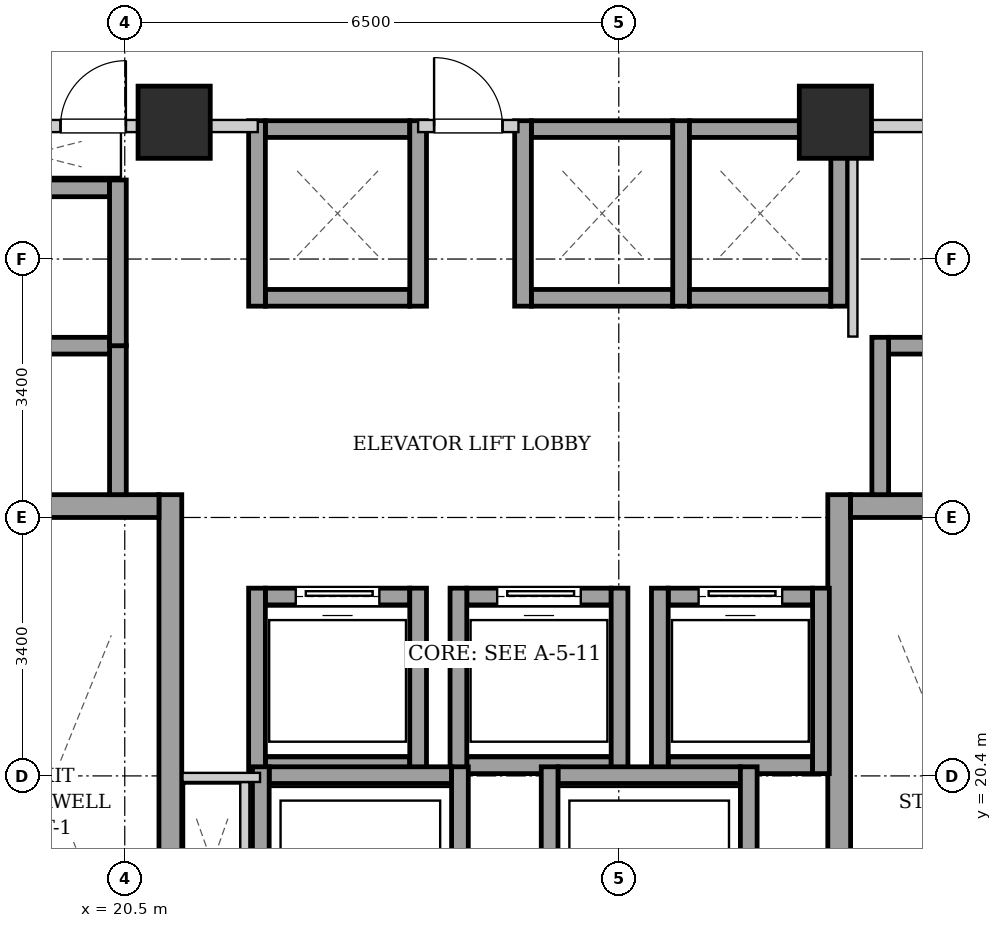
"""IFC4 building model, lengths in metres.
Left out: names, types, materials, properties, quantities, classifications, styles, units other than length and angle.
Written with IfcOpenShell. Run it as: python <this file> out.ifc"""

import sys

from ifc_helpers import new_model, si_unit, direction, frame, frame_2d, origin, origin_2d, place, context, subcontext, project, spatial, rectangle, extrude, element, fill, save


model = new_model("IFC4")
c1 = context("Model", 3, precision=1e-05, world=origin(), true_north=direction((0.0, 1.0)))
c2 = subcontext(c1, "Body", "Model", "MODEL_VIEW")
j1 = project(units=[si_unit("LENGTHUNIT", "METRE"), si_unit("PLANEANGLEUNIT", "RADIAN")], contexts=[c1])
p1 = place(None, origin())
s1 = spatial("IfcSite", under=j1, at=p1, CompositionType="ELEMENT")
p2 = place(p1, origin())
s2 = spatial("IfcBuilding", under=s1, at=p2, CompositionType="ELEMENT")
p3 = place(p2, frame((0.0, 0.0, 127.65)))
s3 = spatial("IfcBuildingStorey", under=s2, at=p3, CompositionType="ELEMENT", Elevation=127.65)
for number, where, z_axis, x_axis in (
    (1, (21.15, 29.0, 0.0), (0.0, 0.0, 1.0), (1.0, 0.0, 0.0)),
    (2, (29.85, 29.0, 0.0), (0.0, 0.0, 1.0), (1.0, 0.0, 0.0)),
):
    element("IfcColumn", number, at=place(p3, frame(where, z_axis=z_axis, x_axis=x_axis)), inside=s3, PredefinedType="COLUMN", context=c2, shape_type="SweptSolid", body=[
        extrude(rectangle(XDim=0.95, YDim=0.95, at=origin_2d()), origin(), (0.0, 0.0, 1.0), 3.25),
    ])
p4 = place(p3, frame((21.1, 15.1, 0.0), z_axis=(0.0, 0.0, 1.0), x_axis=(0.0, 1.0, 0.0)))
e3 = element("IfcWall", 3, at=p4, inside=s3, PredefinedType="SHEAR", context=c2, shape_type="SweptSolid", body=[
    extrude(rectangle(XDim=9.0, YDim=0.3, at=frame_2d((4.5, 0.0))), origin(), (0.0, 0.0, 1.0), 2.99),
])
p5 = place(p3, frame((18.1, 23.95, 0.0), z_axis=(0.0, 0.0, 1.0), x_axis=(1.0, 0.0, 0.0)))
e4 = element("IfcWall", 4, at=p5, inside=s3, PredefinedType="SHEAR", context=c2, shape_type="SweptSolid", body=[
    extrude(rectangle(XDim=2.85, YDim=0.3, at=frame_2d((1.425, 0.0))), origin(), (0.0, 0.0, 1.0), 2.99),
])
p6 = place(p3, frame((29.9, 15.1, 0.0), z_axis=(0.0, 0.0, 1.0), x_axis=(0.0, 1.0, 0.0)))
e5 = element("IfcWall", 5, at=p6, inside=s3, PredefinedType="SHEAR", context=c2, shape_type="SweptSolid", body=[
    extrude(rectangle(XDim=9.0, YDim=0.3, at=frame_2d((4.5, 0.0))), origin(), (0.0, 0.0, 1.0), 2.99),
])
p7 = place(p3, frame((30.05, 23.95, 0.0), z_axis=(0.0, 0.0, 1.0), x_axis=(1.0, 0.0, 0.0)))
e6 = element("IfcWall", 6, at=p7, inside=s3, PredefinedType="SHEAR", context=c2, shape_type="SweptSolid", body=[
    extrude(rectangle(XDim=2.85, YDim=0.3, at=frame_2d((1.425, 0.0))), origin(), (0.0, 0.0, 1.0), 2.99),
])
for number, where, z_axis, x_axis in (
    (7, (22.35, 26.69, 0.0), (0.0, 0.0, 1.0), (1.0, 0.0, 0.0)),
    (8, (22.35, 28.91, 0.0), (0.0, 0.0, 1.0), (1.0, 0.0, 0.0)),
):
    element("IfcWall", number, at=place(p3, frame(where, z_axis=z_axis, x_axis=x_axis)), inside=s3, PredefinedType="SHEAR", context=c2, shape_type="SweptSolid", body=[
        extrude(rectangle(XDim=1.9, YDim=0.22, at=frame_2d((0.95, 0.0))), origin(), (0.0, 0.0, 1.0), 2.99),
    ])
for number, where, z_axis, x_axis in (
    (9, (22.24, 26.58, 0.0), (0.0, 0.0, 1.0), (0.0, 1.0, 0.0)),
    (10, (24.36, 26.58, 0.0), (0.0, 0.0, 1.0), (0.0, 1.0, 0.0)),
):
    element("IfcWall", number, at=place(p3, frame(where, z_axis=z_axis, x_axis=x_axis)), inside=s3, PredefinedType="SHEAR", context=c2, shape_type="SweptSolid", body=[
        extrude(rectangle(XDim=2.44, YDim=0.22, at=frame_2d((1.22, 0.0))), origin(), (0.0, 0.0, 1.0), 2.99),
    ])
for number, where, z_axis, x_axis in (
    (11, (25.85, 26.69, 0.0), (0.0, 0.0, 1.0), (1.0, 0.0, 0.0)),
    (12, (25.85, 28.91, 0.0), (0.0, 0.0, 1.0), (1.0, 0.0, 0.0)),
):
    element("IfcWall", number, at=place(p3, frame(where, z_axis=z_axis, x_axis=x_axis)), inside=s3, PredefinedType="SHEAR", context=c2, shape_type="SweptSolid", body=[
        extrude(rectangle(XDim=1.86, YDim=0.22, at=frame_2d((0.93, 0.0))), origin(), (0.0, 0.0, 1.0), 2.99),
    ])
for number, where, z_axis, x_axis in (
    (13, (25.74, 26.58, 0.0), (0.0, 0.0, 1.0), (0.0, 1.0, 0.0)),
    (14, (27.82, 26.58, 0.0), (0.0, 0.0, 1.0), (0.0, 1.0, 0.0)),
):
    element("IfcWall", number, at=place(p3, frame(where, z_axis=z_axis, x_axis=x_axis)), inside=s3, PredefinedType="SHEAR", context=c2, shape_type="SweptSolid", body=[
        extrude(rectangle(XDim=2.44, YDim=0.22, at=frame_2d((1.22, 0.0))), origin(), (0.0, 0.0, 1.0), 2.99),
    ])
for number, where, z_axis, x_axis in (
    (15, (27.93, 26.69, 0.0), (0.0, 0.0, 1.0), (1.0, 0.0, 0.0)),
    (16, (27.93, 28.91, 0.0), (0.0, 0.0, 1.0), (1.0, 0.0, 0.0)),
):
    element("IfcWall", number, at=place(p3, frame(where, z_axis=z_axis, x_axis=x_axis)), inside=s3, PredefinedType="SHEAR", context=c2, shape_type="SweptSolid", body=[
        extrude(rectangle(XDim=1.86, YDim=0.22, at=frame_2d((0.93, 0.0))), origin(), (0.0, 0.0, 1.0), 2.99),
    ])
p8 = place(p3, frame((29.9, 26.58, 0.0), z_axis=(0.0, 0.0, 1.0), x_axis=(0.0, 1.0, 0.0)))
e17 = element("IfcWall", 17, at=p8, inside=s3, PredefinedType="SHEAR", context=c2, shape_type="SweptSolid", body=[
    extrude(rectangle(XDim=2.44, YDim=0.22, at=frame_2d((1.22, 0.0))), origin(), (0.0, 0.0, 1.0), 2.99),
])
p9 = place(p3, frame((22.35, 20.54, 0.0), z_axis=(0.0, 0.0, 1.0), x_axis=(1.0, 0.0, 0.0)))
e18 = element("IfcWall", 18, at=p9, inside=s3, PredefinedType="SHEAR", context=c2, shape_type="SweptSolid", body=[
    extrude(rectangle(XDim=1.9, YDim=0.22, at=frame_2d((0.95, 0.0))), origin(), (0.0, 0.0, 1.0), 2.99),
])
p10 = place(p3, frame((22.35, 22.76, 0.0), z_axis=(0.0, 0.0, 1.0), x_axis=(1.0, 0.0, 0.0)))
e19 = element("IfcWall", 19, at=p10, inside=s3, PredefinedType="SHEAR", context=c2, shape_type="SweptSolid", body=[
    extrude(rectangle(XDim=1.9, YDim=0.22, at=frame_2d((0.95, 0.0))), origin(), (0.0, 0.0, 1.0), 2.99),
])
p11 = place(p10, frame((0.4, 0.0, 0.0)))
e20 = element("IfcOpeningElement", 20, at=p11, cuts=e19, PredefinedType="OPENING", context=c2, shape_type="SweptSolid", body=[
    extrude(rectangle(XDim=1.1, YDim=2.15, at=frame_2d((0.55, 1.075))), frame((0.0, 0.12, 0.0), z_axis=(0.0, -1.0, 0.0), x_axis=(1.0, 0.0, 0.0)), (0.0, 0.0, 1.0), 0.24),
])
for number, where, z_axis, x_axis in (
    (21, (22.24, 20.43, 0.0), (0.0, 0.0, 1.0), (0.0, 1.0, 0.0)),
    (22, (24.36, 20.43, 0.0), (0.0, 0.0, 1.0), (0.0, 1.0, 0.0)),
):
    element("IfcWall", number, at=place(p3, frame(where, z_axis=z_axis, x_axis=x_axis)), inside=s3, PredefinedType="SHEAR", context=c2, shape_type="SweptSolid", body=[
        extrude(rectangle(XDim=2.44, YDim=0.22, at=frame_2d((1.22, 0.0))), origin(), (0.0, 0.0, 1.0), 2.99),
    ])
p12 = place(p3, frame((25.0, 20.54, 0.0), z_axis=(0.0, 0.0, 1.0), x_axis=(1.0, 0.0, 0.0)))
e23 = element("IfcWall", 23, at=p12, inside=s3, PredefinedType="SHEAR", context=c2, shape_type="SweptSolid", body=[
    extrude(rectangle(XDim=1.9, YDim=0.22, at=frame_2d((0.95, 0.0))), origin(), (0.0, 0.0, 1.0), 2.99),
])
p13 = place(p3, frame((25.0, 22.76, 0.0), z_axis=(0.0, 0.0, 1.0), x_axis=(1.0, 0.0, 0.0)))
e24 = element("IfcWall", 24, at=p13, inside=s3, PredefinedType="SHEAR", context=c2, shape_type="SweptSolid", body=[
    extrude(rectangle(XDim=1.9, YDim=0.22, at=frame_2d((0.95, 0.0))), origin(), (0.0, 0.0, 1.0), 2.99),
])
p14 = place(p13, frame((0.4, 0.0, 0.0)))
e25 = element("IfcOpeningElement", 25, at=p14, cuts=e24, PredefinedType="OPENING", context=c2, shape_type="SweptSolid", body=[
    extrude(rectangle(XDim=1.1, YDim=2.15, at=frame_2d((0.55, 1.075))), frame((0.0, 0.12, 0.0), z_axis=(0.0, -1.0, 0.0), x_axis=(1.0, 0.0, 0.0)), (0.0, 0.0, 1.0), 0.24),
])
for number, where, z_axis, x_axis in (
    (26, (24.89, 20.43, 0.0), (0.0, 0.0, 1.0), (0.0, 1.0, 0.0)),
    (27, (27.01, 20.43, 0.0), (0.0, 0.0, 1.0), (0.0, 1.0, 0.0)),
):
    element("IfcWall", number, at=place(p3, frame(where, z_axis=z_axis, x_axis=x_axis)), inside=s3, PredefinedType="SHEAR", context=c2, shape_type="SweptSolid", body=[
        extrude(rectangle(XDim=2.44, YDim=0.22, at=frame_2d((1.22, 0.0))), origin(), (0.0, 0.0, 1.0), 2.99),
    ])
p15 = place(p3, frame((27.65, 20.54, 0.0), z_axis=(0.0, 0.0, 1.0), x_axis=(1.0, 0.0, 0.0)))
e28 = element("IfcWall", 28, at=p15, inside=s3, PredefinedType="SHEAR", context=c2, shape_type="SweptSolid", body=[
    extrude(rectangle(XDim=1.9, YDim=0.22, at=frame_2d((0.95, 0.0))), origin(), (0.0, 0.0, 1.0), 2.99),
])
p16 = place(p3, frame((27.65, 22.76, 0.0), z_axis=(0.0, 0.0, 1.0), x_axis=(1.0, 0.0, 0.0)))
e29 = element("IfcWall", 29, at=p16, inside=s3, PredefinedType="SHEAR", context=c2, shape_type="SweptSolid", body=[
    extrude(rectangle(XDim=1.9, YDim=0.22, at=frame_2d((0.95, 0.0))), origin(), (0.0, 0.0, 1.0), 2.99),
])
p17 = place(p16, frame((0.4, 0.0, 0.0)))
e30 = element("IfcOpeningElement", 30, at=p17, cuts=e29, PredefinedType="OPENING", context=c2, shape_type="SweptSolid", body=[
    extrude(rectangle(XDim=1.1, YDim=2.15, at=frame_2d((0.55, 1.075))), frame((0.0, 0.12, 0.0), z_axis=(0.0, -1.0, 0.0), x_axis=(1.0, 0.0, 0.0)), (0.0, 0.0, 1.0), 0.24),
])
for number, where, z_axis, x_axis in (
    (31, (27.54, 20.43, 0.0), (0.0, 0.0, 1.0), (0.0, 1.0, 0.0)),
    (32, (29.66, 20.43, 0.0), (0.0, 0.0, 1.0), (0.0, 1.0, 0.0)),
):
    element("IfcWall", number, at=place(p3, frame(where, z_axis=z_axis, x_axis=x_axis)), inside=s3, PredefinedType="SHEAR", context=c2, shape_type="SweptSolid", body=[
        extrude(rectangle(XDim=2.44, YDim=0.22, at=frame_2d((1.22, 0.0))), origin(), (0.0, 0.0, 1.0), 2.99),
    ])
p18 = place(p3, frame((20.41, 24.1, 0.0), z_axis=(0.0, 0.0, 1.0), x_axis=(0.0, 1.0, 0.0)))
e33 = element("IfcWall", 33, at=p18, inside=s3, PredefinedType="SHEAR", context=c2, shape_type="SweptSolid", body=[
    extrude(rectangle(XDim=1.96, YDim=0.22, at=frame_2d((0.98, 0.0))), origin(), (0.0, 0.0, 1.0), 2.99),
])
for number, where, z_axis, x_axis in (
    (34, (18.4, 26.06, 0.0), (0.0, 0.0, 1.0), (1.0, 0.0, 0.0)),
    (35, (18.4, 28.13, 0.0), (0.0, 0.0, 1.0), (1.0, 0.0, 0.0)),
):
    element("IfcWall", number, at=place(p3, frame(where, z_axis=z_axis, x_axis=x_axis)), inside=s3, PredefinedType="SHEAR", context=c2, shape_type="SweptSolid", body=[
        extrude(rectangle(XDim=1.9, YDim=0.22, at=frame_2d((0.95, 0.0))), origin(), (0.0, 0.0, 1.0), 2.99),
    ])
p19 = place(p3, frame((20.41, 26.06, 0.0), z_axis=(0.0, 0.0, 1.0), x_axis=(0.0, 1.0, 0.0)))
e36 = element("IfcWall", 36, at=p19, inside=s3, PredefinedType="SHEAR", context=c2, shape_type="SweptSolid", body=[
    extrude(rectangle(XDim=2.18, YDim=0.22, at=frame_2d((1.09, 0.0))), origin(), (0.0, 0.0, 1.0), 2.99),
])
p20 = place(p3, frame((30.55, 26.06, 0.0), z_axis=(0.0, 0.0, 1.0), x_axis=(1.0, 0.0, 0.0)))
e37 = element("IfcWall", 37, at=p20, inside=s3, PredefinedType="SHEAR", context=c2, shape_type="SweptSolid", body=[
    extrude(rectangle(XDim=1.9, YDim=0.22, at=frame_2d((0.95, 0.0))), origin(), (0.0, 0.0, 1.0), 2.99),
])
p21 = place(p3, frame((30.44, 24.1, 0.0), z_axis=(0.0, 0.0, 1.0), x_axis=(0.0, 1.0, 0.0)))
e38 = element("IfcWall", 38, at=p21, inside=s3, PredefinedType="SHEAR", context=c2, shape_type="SweptSolid", body=[
    extrude(rectangle(XDim=2.07, YDim=0.22, at=frame_2d((1.035, 0.0))), origin(), (0.0, 0.0, 1.0), 2.99),
])
p22 = place(p3, frame((22.4, 20.41, 0.0), z_axis=(0.0, 0.0, 1.0), x_axis=(1.0, 0.0, 0.0)))
e39 = element("IfcWall", 39, at=p22, inside=s3, PredefinedType="SHEAR", context=c2, shape_type="SweptSolid", body=[
    extrude(rectangle(XDim=2.4, YDim=0.22, at=frame_2d((1.2, 0.0))), origin(), (0.0, 0.0, 1.0), 2.99),
])
for number, where, z_axis, x_axis in (
    (40, (22.29, 17.98, 0.0), (0.0, 0.0, 1.0), (0.0, 1.0, 0.0)),
    (41, (24.91, 17.98, 0.0), (0.0, 0.0, 1.0), (0.0, 1.0, 0.0)),
):
    element("IfcWall", number, at=place(p3, frame(where, z_axis=z_axis, x_axis=x_axis)), inside=s3, PredefinedType="SHEAR", context=c2, shape_type="SweptSolid", body=[
        extrude(rectangle(XDim=2.54, YDim=0.22, at=frame_2d((1.27, 0.0))), origin(), (0.0, 0.0, 1.0), 2.99),
    ])
p23 = place(p3, frame((26.2, 20.41, 0.0), z_axis=(0.0, 0.0, 1.0), x_axis=(1.0, 0.0, 0.0)))
e42 = element("IfcWall", 42, at=p23, inside=s3, PredefinedType="SHEAR", context=c2, shape_type="SweptSolid", body=[
    extrude(rectangle(XDim=2.4, YDim=0.22, at=frame_2d((1.2, 0.0))), origin(), (0.0, 0.0, 1.0), 2.99),
])
for number, where, z_axis, x_axis in (
    (43, (26.09, 17.98, 0.0), (0.0, 0.0, 1.0), (0.0, 1.0, 0.0)),
    (44, (28.71, 17.98, 0.0), (0.0, 0.0, 1.0), (0.0, 1.0, 0.0)),
):
    element("IfcWall", number, at=place(p3, frame(where, z_axis=z_axis, x_axis=x_axis)), inside=s3, PredefinedType="SHEAR", context=c2, shape_type="SweptSolid", body=[
        extrude(rectangle(XDim=2.54, YDim=0.22, at=frame_2d((1.27, 0.0))), origin(), (0.0, 0.0, 1.0), 2.99),
    ])
p24 = place(p3, frame((24.36, 28.95, 0.0), z_axis=(0.0, 0.0, 1.0), x_axis=(1.0, 0.0, 0.0)))
e45 = element("IfcWall", 45, at=p24, inside=s3, PredefinedType="PARTITIONING", context=c2, shape_type="SweptSolid", body=[
    extrude(rectangle(XDim=1.32, YDim=0.16, at=frame_2d((0.66, 0.0))), origin(), (0.0, 0.0, 1.0), 2.426),
])
p25 = place(p24, frame((0.21, 0.0, 0.0)))
e46 = element("IfcOpeningElement", 46, at=p25, cuts=e45, PredefinedType="OPENING", context=c2, shape_type="SweptSolid", body=[
    extrude(rectangle(XDim=0.9, YDim=2.05, at=frame_2d((0.45, 1.025))), frame((0.0, 0.09, 0.0), z_axis=(0.0, -1.0, 0.0), x_axis=(1.0, 0.0, 0.0)), (0.0, 0.0, 1.0), 0.18),
])
p26 = place(p3, frame((17.96, 28.95, 0.0), z_axis=(0.0, 0.0, 1.0), x_axis=(1.0, 0.0, 0.0)))
e47 = element("IfcWall", 47, at=p26, inside=s3, PredefinedType="PARTITIONING", context=c2, shape_type="SweptSolid", body=[
    extrude(rectangle(XDim=4.29, YDim=0.16, at=frame_2d((2.145, 0.0))), origin(), (0.0, 0.0, 1.0), 2.426),
])
p27 = place(p26, frame((1.695, 0.0, 0.0)))
e48 = element("IfcOpeningElement", 48, at=p27, cuts=e47, PredefinedType="OPENING", context=c2, shape_type="SweptSolid", body=[
    extrude(rectangle(XDim=0.86, YDim=2.05, at=frame_2d((0.43, 1.025))), frame((0.0, 0.09, 0.0), z_axis=(0.0, -1.0, 0.0), x_axis=(1.0, 0.0, 0.0)), (0.0, 0.0, 1.0), 0.18),
])
p28 = place(p3, frame((22.08, 18.2, 0.0), z_axis=(0.0, 0.0, 1.0), x_axis=(0.0, 1.0, 0.0)))
e49 = element("IfcWall", 49, at=p28, inside=s3, PredefinedType="PARTITIONING", context=c2, shape_type="SweptSolid", body=[
    extrude(rectangle(XDim=2.12, YDim=0.12, at=frame_2d((1.06, 0.0))), origin(), (0.0, 0.0, 1.0), 2.99),
])
p29 = place(p3, frame((22.28, 20.38, 0.0), z_axis=(0.0, 0.0, 1.0), x_axis=(-1.0, 0.0, 0.0)))
e50 = element("IfcWall", 50, at=p29, inside=s3, PredefinedType="PARTITIONING", context=c2, shape_type="SweptSolid", body=[
    extrude(rectangle(XDim=1.02, YDim=0.12, at=frame_2d((0.51, 0.0))), origin(), (0.0, 0.0, 1.0), 2.99),
])
p30 = place(p3, frame((30.08, 26.18, 0.0), z_axis=(0.0, 0.0, 1.0), x_axis=(0.0, 1.0, 0.0)))
e51 = element("IfcWall", 51, at=p30, inside=s3, PredefinedType="PARTITIONING", context=c2, shape_type="SweptSolid", body=[
    extrude(rectangle(XDim=2.68, YDim=0.12, at=frame_2d((1.34, 0.0))), origin(), (0.0, 0.0, 1.0), 2.99),
])
p31 = place(p3, frame((30.08, 28.95, 0.0), z_axis=(0.0, 0.0, 1.0), x_axis=(1.0, 0.0, 0.0)))
e52 = element("IfcWall", 52, at=p31, inside=s3, PredefinedType="PARTITIONING", context=c2, shape_type="SweptSolid", body=[
    extrude(rectangle(XDim=2.96, YDim=0.16, at=frame_2d((1.48, 0.0))), origin(), (0.0, 0.0, 1.0), 2.99),
])
p32 = place(p31, frame((1.045, 0.0, 0.0)))
e53 = element("IfcOpeningElement", 53, at=p32, cuts=e52, PredefinedType="OPENING", context=c2, shape_type="SweptSolid", body=[
    extrude(rectangle(XDim=0.86, YDim=2.05, at=frame_2d((0.43, 1.025))), frame((0.0, 0.09, 0.0), z_axis=(0.0, -1.0, 0.0), x_axis=(1.0, 0.0, 0.0)), (0.0, 0.0, 1.0), 0.18),
])
p33 = place(p11, origin())
e54 = element("IfcDoor", 54, at=p33, inside=s3, OperationType="SLIDING_TO_LEFT", PredefinedType="DOOR", context=c2, shape_type="SweptSolid", body=[
    extrude(rectangle(XDim=1.1, YDim=2.15, at=frame_2d((0.55, 1.075))), frame((0.0, 0.025, 0.0), z_axis=(0.0, -1.0, 0.0), x_axis=(1.0, 0.0, 0.0)), (0.0, 0.0, 1.0), 0.05),
])
fill(e20, e54)
p34 = place(p14, origin())
e55 = element("IfcDoor", 55, at=p34, inside=s3, OperationType="SLIDING_TO_LEFT", PredefinedType="DOOR", context=c2, shape_type="SweptSolid", body=[
    extrude(rectangle(XDim=1.1, YDim=2.15, at=frame_2d((0.55, 1.075))), frame((0.0, 0.025, 0.0), z_axis=(0.0, -1.0, 0.0), x_axis=(1.0, 0.0, 0.0)), (0.0, 0.0, 1.0), 0.05),
])
fill(e25, e55)
p35 = place(p17, origin())
e56 = element("IfcDoor", 56, at=p35, inside=s3, OperationType="SLIDING_TO_LEFT", PredefinedType="DOOR", context=c2, shape_type="SweptSolid", body=[
    extrude(rectangle(XDim=1.1, YDim=2.15, at=frame_2d((0.55, 1.075))), frame((0.0, 0.025, 0.0), z_axis=(0.0, -1.0, 0.0), x_axis=(1.0, 0.0, 0.0)), (0.0, 0.0, 1.0), 0.05),
])
fill(e30, e56)
p36 = place(p25, origin())
e57 = element("IfcDoor", 57, at=p36, inside=s3, OperationType="SINGLE_SWING_LEFT", PredefinedType="DOOR", context=c2, shape_type="SweptSolid", body=[
    extrude(rectangle(XDim=0.9, YDim=2.05, at=frame_2d((0.45, 1.025))), frame((0.0, 0.025, 0.0), z_axis=(0.0, -1.0, 0.0), x_axis=(1.0, 0.0, 0.0)), (0.0, 0.0, 1.0), 0.05),
])
fill(e46, e57)
p37 = place(p27, origin())
e58 = element("IfcDoor", 58, at=p37, inside=s3, OperationType="SINGLE_SWING_RIGHT", PredefinedType="DOOR", context=c2, shape_type="SweptSolid", body=[
    extrude(rectangle(XDim=0.86, YDim=2.05, at=frame_2d((0.43, 1.025))), frame((0.0, 0.025, 0.0), z_axis=(0.0, -1.0, 0.0), x_axis=(1.0, 0.0, 0.0)), (0.0, 0.0, 1.0), 0.05),
])
fill(e48, e58)
save(model, sys.argv[1])
